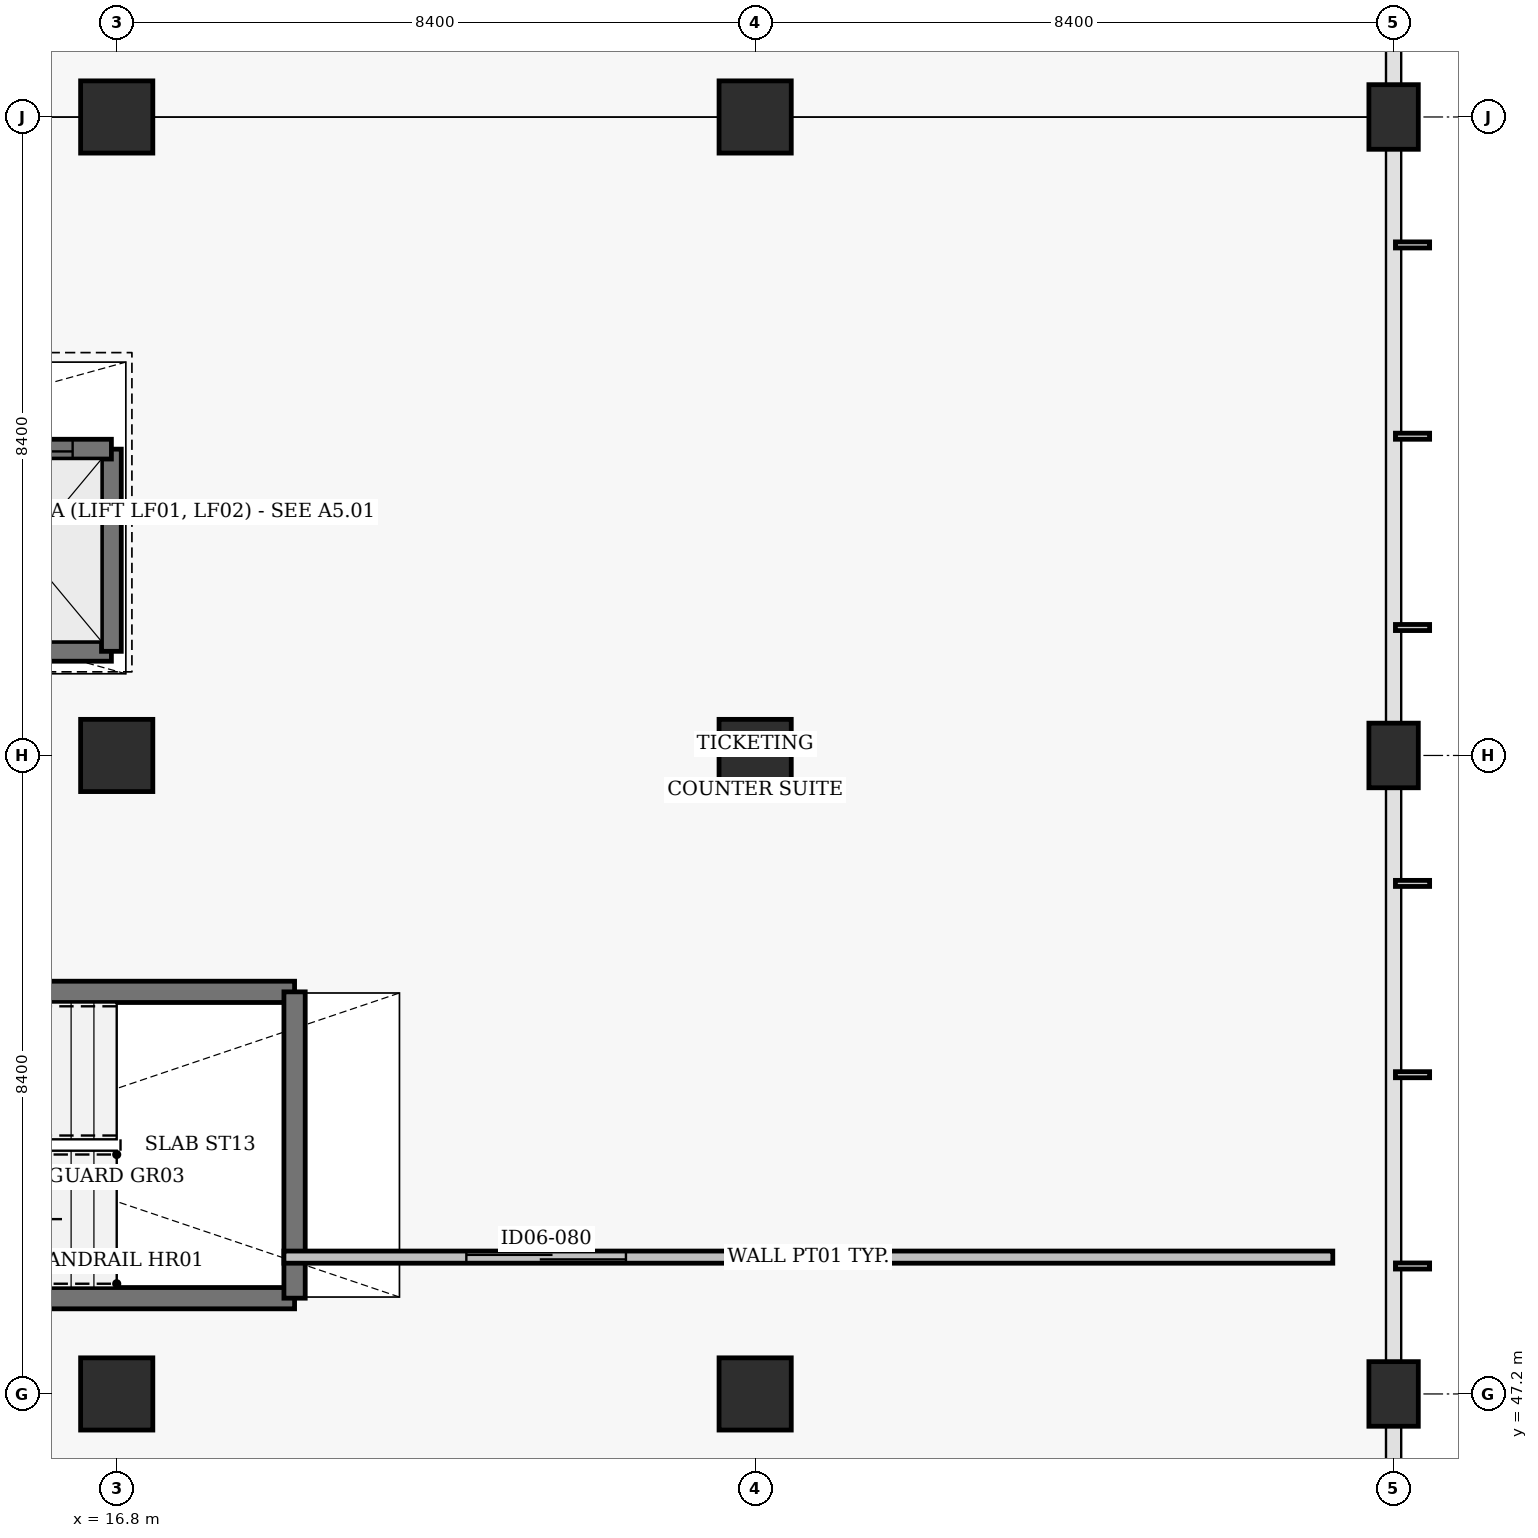
"""IFC4 building model, lengths in metres.
Left out: names, types, materials, properties, quantities, classifications, styles, units other than length and angle.
Written with IfcOpenShell. Run it as: python <this file> out.ifc"""

import sys

from ifc_helpers import new_model, si_unit, direction, frame, frame_2d, origin, origin_2d, place, context, subcontext, project, spatial, rectangle, circle, extrude, element, fill, save


model = new_model("IFC4")
c1 = context("Model", 3, precision=1e-05, world=origin(), true_north=direction((0.0, 1.0)))
c2 = subcontext(c1, "Body", "Model", "MODEL_VIEW")
j1 = project(units=[si_unit("LENGTHUNIT", "METRE"), si_unit("PLANEANGLEUNIT", "RADIAN")], contexts=[c1])
p1 = place(None, origin())
s1 = spatial("IfcSite", under=j1, at=p1, CompositionType="ELEMENT")
p2 = place(p1, origin())
s2 = spatial("IfcBuilding", under=s1, at=p2, CompositionType="ELEMENT")
p3 = place(p2, origin())
s3 = spatial("IfcBuildingStorey", under=s2, at=p3, CompositionType="ELEMENT", Elevation=0.0)
for number, where, z_axis, x_axis in (
    (1, (16.8, 47.2, -0.46), (0.0, 0.0, 1.0), (1.0, 0.0, 0.0)),
    (2, (16.8, 55.6, -0.46), (0.0, 0.0, 1.0), (1.0, 0.0, 0.0)),
    (3, (16.8, 64.0, -0.46), (0.0, 0.0, 1.0), (1.0, 0.0, 0.0)),
    (4, (25.2, 47.2, -0.46), (0.0, 0.0, 1.0), (1.0, 0.0, 0.0)),
    (5, (25.2, 55.6, -0.46), (0.0, 0.0, 1.0), (1.0, 0.0, 0.0)),
    (6, (25.2, 64.0, -0.46), (0.0, 0.0, 1.0), (1.0, 0.0, 0.0)),
):
    element("IfcColumn", number, at=place(p3, frame(where, z_axis=z_axis, x_axis=x_axis)), inside=s3, PredefinedType="COLUMN", context=c2, shape_type="SweptSolid", body=[
        extrude(circle(Radius=0.475, at=origin_2d()), origin(), (0.0, 0.0, 1.0), 5.9),
    ])
for number, where, z_axis, x_axis in (
    (7, (33.6, 47.2, -0.46), (0.0, 0.0, 1.0), (1.0, 0.0, 0.0)),
    (8, (33.6, 55.6, -0.46), (0.0, 0.0, 1.0), (1.0, 0.0, 0.0)),
    (9, (33.6, 64.0, -0.46), (0.0, 0.0, 1.0), (1.0, 0.0, 0.0)),
):
    element("IfcColumn", number, at=place(p3, frame(where, z_axis=z_axis, x_axis=x_axis)), inside=s3, PredefinedType="COLUMN", context=c2, shape_type="SweptSolid", body=[
        extrude(rectangle(XDim=0.65, YDim=0.85, at=origin_2d()), origin(), (0.0, 0.0, 1.0), 5.9),
    ])
p4 = place(p3, frame((14.47, 56.97, 0.0), z_axis=(0.0, 0.0, 1.0), x_axis=(1.0, 0.0, 0.0)))
e10 = element("IfcWall", 10, at=p4, inside=s3, PredefinedType="SHEAR", context=c2, shape_type="SweptSolid", body=[
    extrude(rectangle(XDim=2.26, YDim=0.26, at=frame_2d((1.13, 0.0))), origin(), (0.0, 0.0, 1.0), 5.44),
])
p5 = place(p3, frame((16.73, 56.97, 0.0), z_axis=(0.0, 0.0, 1.0), x_axis=(0.0, 1.0, 0.0)))
e11 = element("IfcWall", 11, at=p5, inside=s3, PredefinedType="SHEAR", context=c2, shape_type="SweptSolid", body=[
    extrude(rectangle(XDim=2.66, YDim=0.26, at=frame_2d((1.33, 0.0))), origin(), (0.0, 0.0, 1.0), 5.44),
])
p6 = place(p3, frame((14.47, 59.63, 0.0), z_axis=(0.0, 0.0, 1.0), x_axis=(1.0, 0.0, 0.0)))
e12 = element("IfcWall", 12, at=p6, inside=s3, PredefinedType="SHEAR", context=c2, shape_type="SweptSolid", body=[
    extrude(rectangle(XDim=2.26, YDim=0.26, at=frame_2d((1.13, 0.0))), origin(), (0.0, 0.0, 1.0), 5.44),
])
p7 = place(p6, frame((0.51, 0.0, 0.0)))
e13 = element("IfcOpeningElement", 13, at=p7, cuts=e12, PredefinedType="OPENING", context=c2, shape_type="SweptSolid", body=[
    extrude(rectangle(XDim=1.24, YDim=2.14, at=frame_2d((0.62, 1.07))), frame((0.0, 0.14, 0.0), z_axis=(0.0, -1.0, 0.0), x_axis=(1.0, 0.0, 0.0)), (0.0, 0.0, 1.0), 0.28),
])
for number, where, z_axis, x_axis in (
    (14, (10.06, 48.46, 0.0), (0.0, 0.0, 1.0), (1.0, 0.0, 0.0)),
    (15, (10.06, 52.49, 0.0), (0.0, 0.0, 1.0), (1.0, 0.0, 0.0)),
):
    element("IfcWall", number, at=place(p3, frame(where, z_axis=z_axis, x_axis=x_axis)), inside=s3, PredefinedType="SHEAR", context=c2, shape_type="SweptSolid", body=[
        extrude(rectangle(XDim=9.08, YDim=0.28, at=frame_2d((4.54, 0.0))), origin(), (0.0, 0.0, 1.0), 5.44),
    ])
p8 = place(p3, frame((19.14, 48.46, 0.0), z_axis=(0.0, 0.0, 1.0), x_axis=(0.0, 1.0, 0.0)))
e16 = element("IfcWall", 16, at=p8, inside=s3, PredefinedType="SHEAR", context=c2, shape_type="SweptSolid", body=[
    extrude(rectangle(XDim=4.03, YDim=0.28, at=frame_2d((2.015, 0.0))), origin(), (0.0, 0.0, 1.0), 5.44),
])
p9 = place(p3, frame((19.0, 49.0, 0.0), z_axis=(0.0, 0.0, 1.0), x_axis=(1.0, 0.0, 0.0)))
e17 = element("IfcWall", 17, at=p9, inside=s3, PredefinedType="PARTITIONING", context=c2, shape_type="SweptSolid", body=[
    extrude(rectangle(XDim=13.8, YDim=0.16, at=frame_2d((6.9, 0.0))), origin(), (0.0, 0.0, 1.0), 3.1),
])
p10 = place(p9, frame((2.4, 0.0, 0.0)))
e18 = element("IfcOpeningElement", 18, at=p10, cuts=e17, PredefinedType="OPENING", context=c2, shape_type="SweptSolid", body=[
    extrude(rectangle(XDim=2.1, YDim=2.22, at=frame_2d((1.05, 1.11))), frame((0.0, 0.09, 0.0), z_axis=(0.0, -1.0, 0.0), x_axis=(1.0, 0.0, 0.0)), (0.0, 0.0, 1.0), 0.18),
])
p11 = place(p7, origin())
e19 = element("IfcDoor", 19, at=p11, inside=s3, OperationType="DOUBLE_DOOR_SLIDING", PredefinedType="DOOR", context=c2, shape_type="SweptSolid", body=[
    extrude(rectangle(XDim=1.24, YDim=2.14, at=frame_2d((0.62, 1.07))), frame((0.0, 0.025, 0.0), z_axis=(0.0, -1.0, 0.0), x_axis=(1.0, 0.0, 0.0)), (0.0, 0.0, 1.0), 0.05),
])
fill(e13, e19)
p12 = place(p10, origin())
e20 = element("IfcDoor", 20, at=p12, inside=s3, OperationType="DOUBLE_DOOR_SLIDING", PredefinedType="DOOR", context=c2, shape_type="SweptSolid", body=[
    extrude(rectangle(XDim=2.1, YDim=2.22, at=frame_2d((1.05, 1.11))), frame((0.0, 0.025, 0.0), z_axis=(0.0, -1.0, 0.0), x_axis=(1.0, 0.0, 0.0)), (0.0, 0.0, 1.0), 0.05),
])
fill(e18, e20)
save(model, sys.argv[1])
